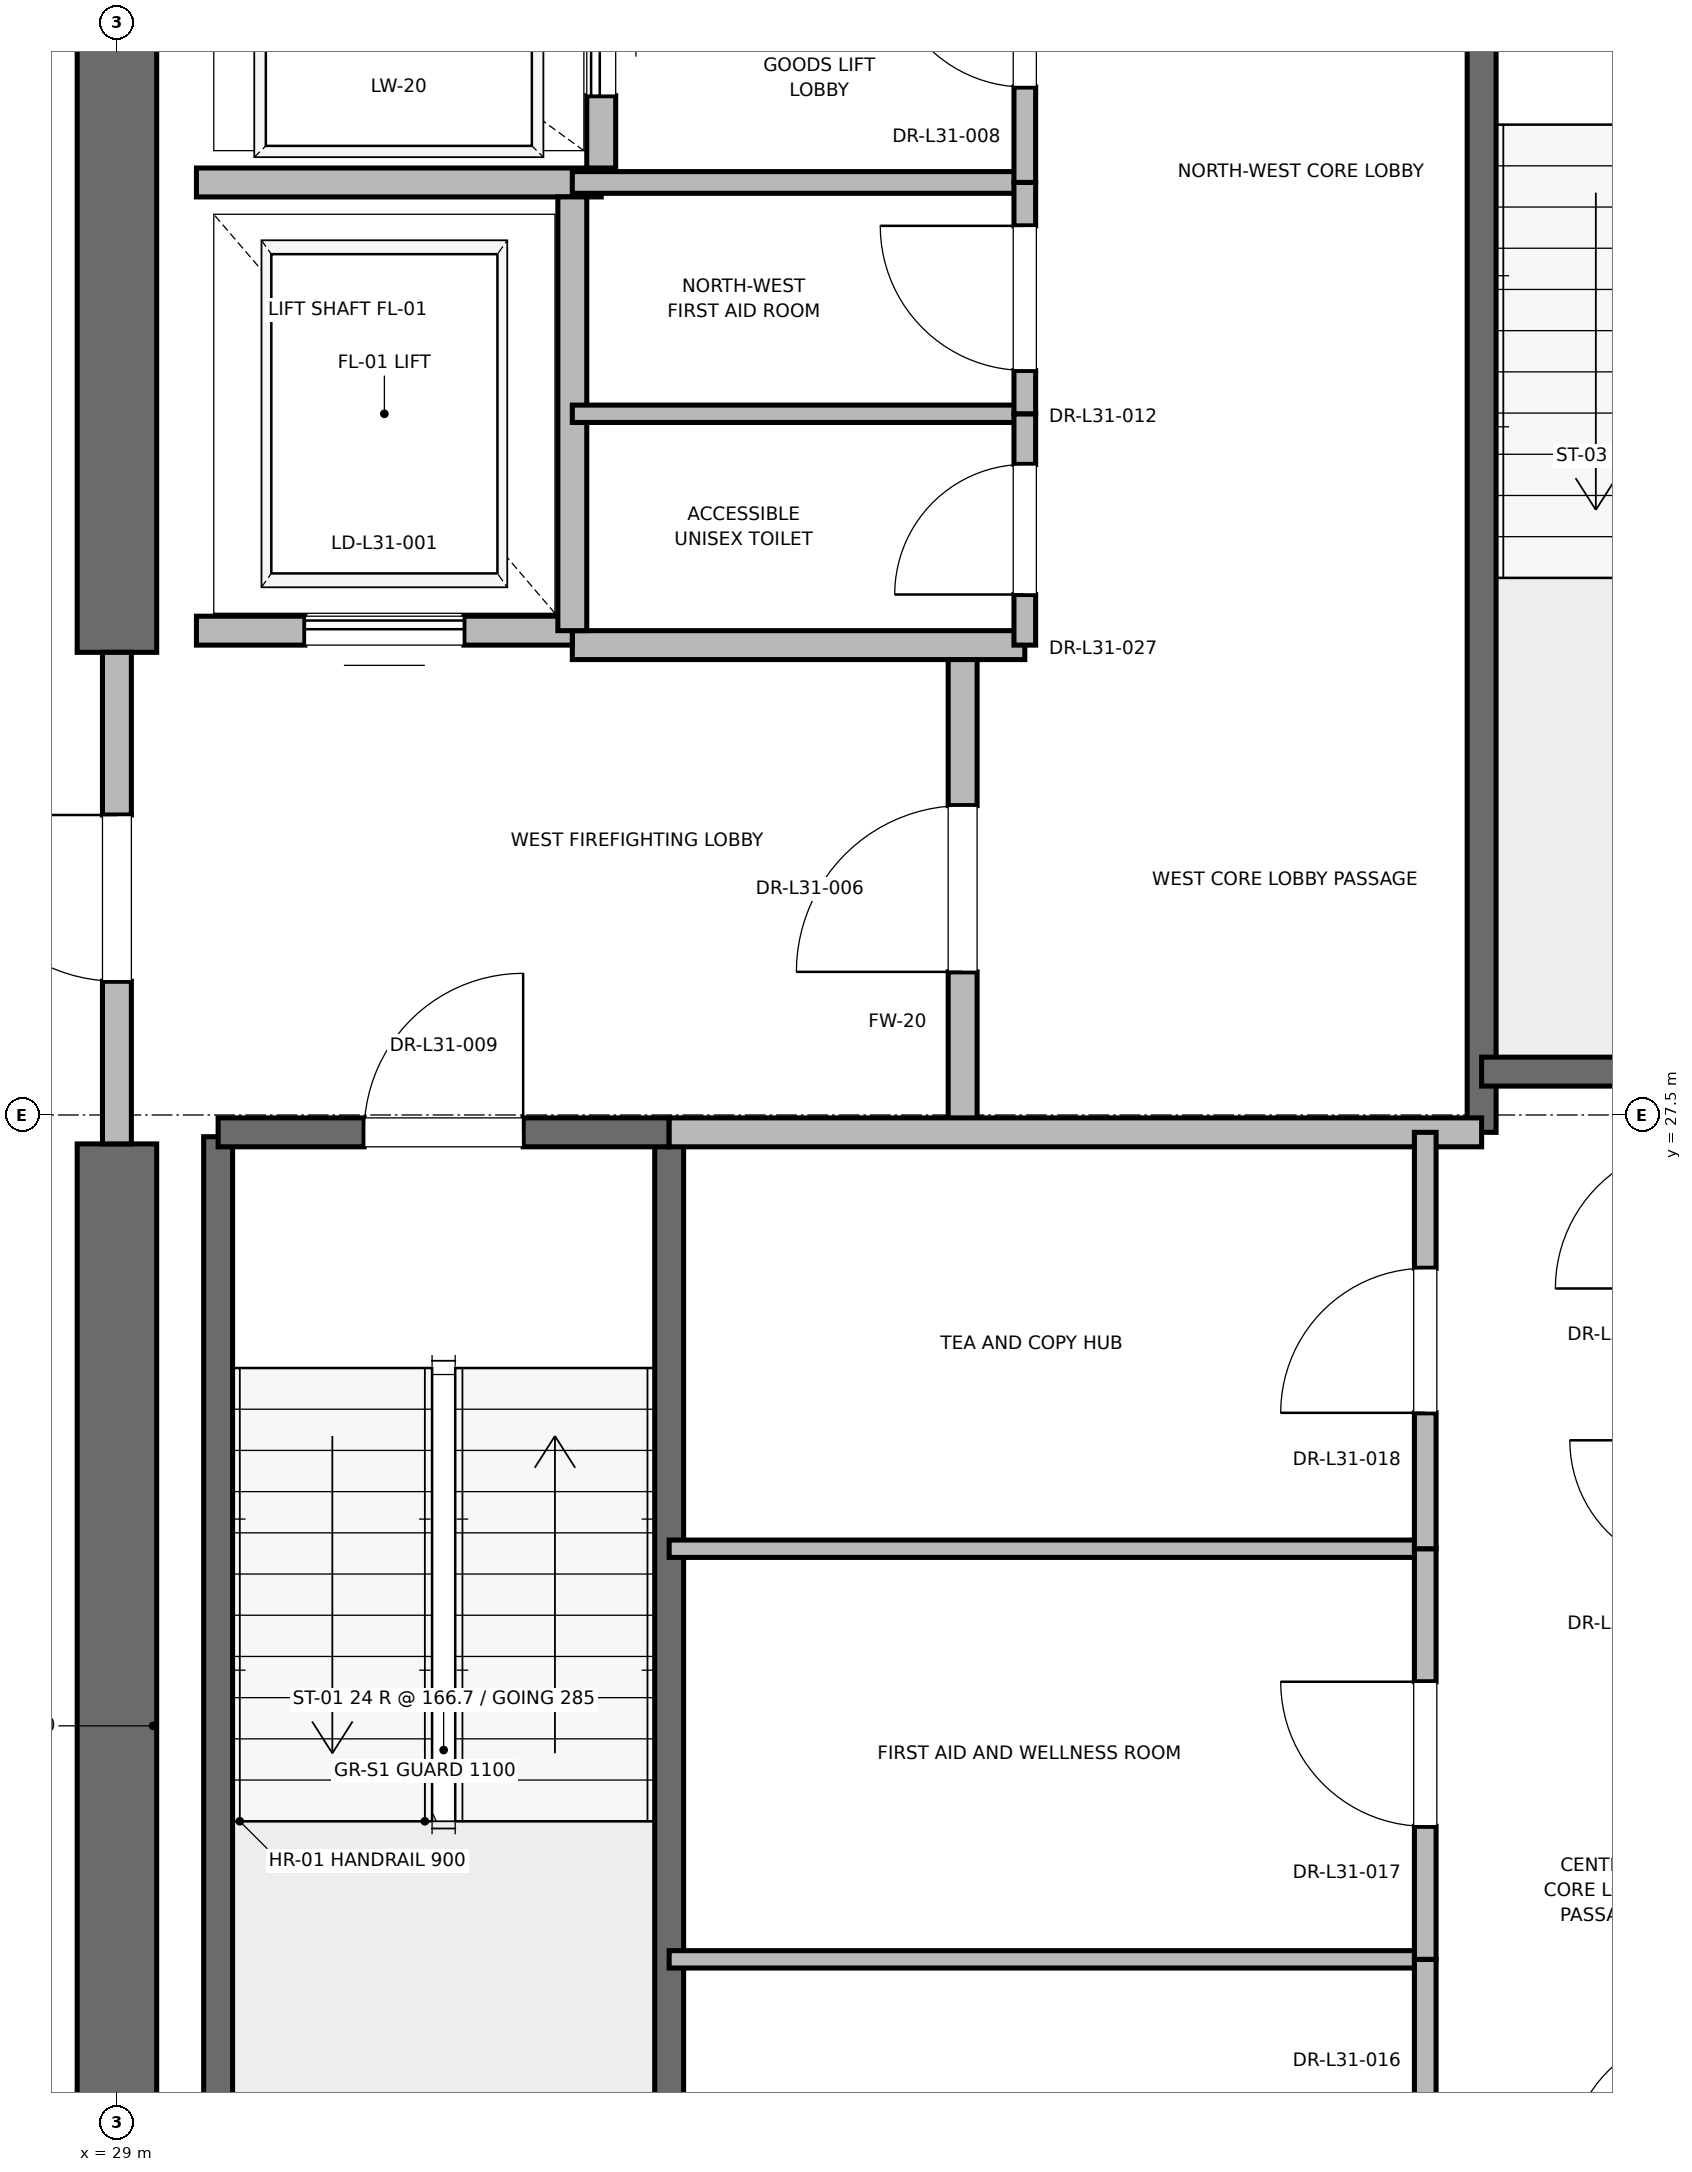
"""IFC4 building model, lengths in metres.
Left out: names, types, materials, properties, quantities, classifications, styles, units other than length and angle.
Written with IfcOpenShell. Run it as: python <this file> out.ifc"""

import sys

from ifc_helpers import new_model, si_unit, direction, frame, frame_2d, origin, place, context, subcontext, project, spatial, rectangle, extrude, element, fill, save


model = new_model("IFC4")
c1 = context("Model", 3, precision=1e-05, world=origin(), true_north=direction((0.0, 1.0)))
c2 = subcontext(c1, "Body", "Model", "MODEL_VIEW")
j1 = project(units=[si_unit("LENGTHUNIT", "METRE"), si_unit("PLANEANGLEUNIT", "RADIAN")], contexts=[c1])
p1 = place(None, origin())
s1 = spatial("IfcSite", under=j1, at=p1, CompositionType="ELEMENT")
p2 = place(p1, origin())
s2 = spatial("IfcBuilding", under=s1, at=p2, CompositionType="ELEMENT")
p3 = place(p2, frame((0.0, 0.0, 136.4)))
s3 = spatial("IfcBuildingStorey", under=s2, at=p3, CompositionType="ELEMENT", Elevation=136.4)
p4 = place(p3, frame((29.0, 18.5, 0.0), z_axis=(0.0, 0.0, 1.0), x_axis=(0.0, 1.0, 0.0)))
e1 = element("IfcWall", 1, at=p4, inside=s3, PredefinedType="SHEAR", context=c2, shape_type="SweptSolid", body=[
    extrude(rectangle(XDim=8.8, YDim=0.55, at=frame_2d((4.4, 0.0))), origin(), (0.0, 0.0, 1.0), 3.775),
])
p5 = place(p3, frame((29.0, 30.7, 0.0), z_axis=(0.0, 0.0, 1.0), x_axis=(0.0, 1.0, 0.0)))
e2 = element("IfcWall", 2, at=p5, inside=s3, PredefinedType="SHEAR", context=c2, shape_type="SweptSolid", body=[
    extrude(rectangle(XDim=5.8, YDim=0.55, at=frame_2d((2.9, 0.0))), origin(), (0.0, 0.0, 1.0), 3.775),
])
p6 = place(p3, frame((29.7, 19.2, 0.0), z_axis=(0.0, 0.0, 1.0), x_axis=(0.0, 1.0, 0.0)))
e3 = element("IfcWall", 3, at=p6, inside=s3, PredefinedType="SOLIDWALL", context=c2, shape_type="SweptSolid", body=[
    extrude(rectangle(XDim=8.15, YDim=0.2, at=frame_2d((4.075, 0.0))), origin(), (0.0, 0.0, 1.0), 3.775),
])
p7 = place(p3, frame((32.82, 18.6, 0.0), z_axis=(0.0, 0.0, 1.0), x_axis=(0.0, 1.0, 0.0)))
e4 = element("IfcWall", 4, at=p7, inside=s3, PredefinedType="SOLIDWALL", context=c2, shape_type="SweptSolid", body=[
    extrude(rectangle(XDim=8.78, YDim=0.2, at=frame_2d((4.39, 0.0))), origin(), (0.0, 0.0, 1.0), 3.775),
])
p8 = place(p3, frame((29.7, 27.38, 0.0), z_axis=(0.0, 0.0, 1.0), x_axis=(1.0, 0.0, 0.0)))
e5 = element("IfcWall", 5, at=p8, inside=s3, PredefinedType="SOLIDWALL", context=c2, shape_type="SweptSolid", body=[
    extrude(rectangle(XDim=3.12, YDim=0.2, at=frame_2d((1.56, 0.0))), origin(), (0.0, 0.0, 1.0), 3.775),
])
p9 = place(p8, frame((1.01, 0.0, 0.0)))
e6 = element("IfcOpeningElement", 6, at=p9, cuts=e5, PredefinedType="OPENING", context=c2, shape_type="SweptSolid", body=[
    extrude(rectangle(XDim=1.1, YDim=2.15, at=frame_2d((0.55, 1.075))), frame((0.0, 0.1, 0.0), z_axis=(0.0, -1.0, 0.0), x_axis=(1.0, 0.0, 0.0)), (0.0, 0.0, 1.0), 0.2),
])
p10 = place(p3, frame((38.44, 27.38, 0.0), z_axis=(0.0, 0.0, 1.0), x_axis=(0.0, 1.0, 0.0)))
e7 = element("IfcWall", 7, at=p10, inside=s3, PredefinedType="SOLIDWALL", context=c2, shape_type="SweptSolid", body=[
    extrude(rectangle(XDim=8.87, YDim=0.2, at=frame_2d((4.435, 0.0))), origin(), (0.0, 0.0, 1.0), 3.775),
])
p11 = place(p3, frame((38.44, 27.8, 0.0), z_axis=(0.0, 0.0, 1.0), x_axis=(1.0, 0.0, 0.0)))
e8 = element("IfcWall", 8, at=p11, inside=s3, PredefinedType="SOLIDWALL", context=c2, shape_type="SweptSolid", body=[
    extrude(rectangle(XDim=3.32, YDim=0.2, at=frame_2d((1.66, 0.0))), origin(), (0.0, 0.0, 1.0), 3.775),
])
p12 = place(p3, frame((34.85, 27.38, 0.0), z_axis=(0.0, 0.0, 1.0), x_axis=(0.0, 1.0, 0.0)))
e9 = element("IfcWall", 9, at=p12, inside=s3, PredefinedType="PARTITIONING", context=c2, shape_type="SweptSolid", body=[
    extrude(rectangle(XDim=3.37, YDim=0.2, at=frame_2d((1.685, 0.0))), origin(), (0.0, 0.0, 1.0), 3.775),
])
p13 = place(p12, frame((1.11, 0.0, 0.0)))
e10 = element("IfcOpeningElement", 10, at=p13, cuts=e9, PredefinedType="OPENING", context=c2, shape_type="SweptSolid", body=[
    extrude(rectangle(XDim=1.15, YDim=2.2, at=frame_2d((0.575, 1.1))), frame((0.0, 0.1, 0.0), z_axis=(0.0, -1.0, 0.0), x_axis=(1.0, 0.0, 0.0)), (0.0, 0.0, 1.0), 0.2),
])
p14 = place(p3, frame((29.0, 27.3, 0.0), z_axis=(0.0, 0.0, 1.0), x_axis=(0.0, 1.0, 0.0)))
e11 = element("IfcWall", 11, at=p14, inside=s3, PredefinedType="PARTITIONING", context=c2, shape_type="SweptSolid", body=[
    extrude(rectangle(XDim=3.4, YDim=0.2, at=frame_2d((1.7, 0.0))), origin(), (0.0, 0.0, 1.0), 2.755),
])
p15 = place(p14, frame((1.125, 0.0, 0.0)))
e12 = element("IfcOpeningElement", 12, at=p15, cuts=e11, PredefinedType="OPENING", context=c2, shape_type="SweptSolid", body=[
    extrude(rectangle(XDim=1.15, YDim=2.2, at=frame_2d((0.575, 1.1))), frame((0.0, 0.1, 0.0), z_axis=(0.0, -1.0, 0.0), x_axis=(1.0, 0.0, 0.0)), (0.0, 0.0, 1.0), 0.2),
])
p16 = place(p3, frame((32.82, 27.38, 0.0), z_axis=(0.0, 0.0, 1.0), x_axis=(1.0, 0.0, 0.0)))
e13 = element("IfcWall", 13, at=p16, inside=s3, PredefinedType="PARTITIONING", context=c2, shape_type="SweptSolid", body=[
    extrude(rectangle(XDim=5.62, YDim=0.2, at=frame_2d((2.81, 0.0))), origin(), (0.0, 0.0, 1.0), 3.775),
])
p17 = place(p3, frame((32.15, 30.75, 0.0), z_axis=(0.0, 0.0, 1.0), x_axis=(1.0, 0.0, 0.0)))
e14 = element("IfcWall", 14, at=p17, inside=s3, PredefinedType="PARTITIONING", context=c2, shape_type="SweptSolid", body=[
    extrude(rectangle(XDim=3.13, YDim=0.2, at=frame_2d((1.565, 0.0))), origin(), (0.0, 0.0, 1.0), 3.775),
])
p18 = place(p3, frame((29.55, 30.85, 0.0), z_axis=(0.0, 0.0, 1.0), x_axis=(1.0, 0.0, 0.0)))
e15 = element("IfcWall", 15, at=p18, inside=s3, PredefinedType="SOLIDWALL", context=c2, shape_type="SweptSolid", body=[
    extrude(rectangle(XDim=2.6, YDim=0.2, at=frame_2d((1.3, 0.0))), origin(), (0.0, 0.0, 1.0), 2.755),
])
p19 = place(p18, frame((0.75, 0.0, 0.0)))
e16 = element("IfcOpeningElement", 16, at=p19, cuts=e15, PredefinedType="OPENING", context=c2, shape_type="SweptSolid", body=[
    extrude(rectangle(XDim=1.1, YDim=2.2, at=frame_2d((0.55, 1.1))), frame((0.0, 0.1, 0.0), z_axis=(0.0, -1.0, 0.0), x_axis=(1.0, 0.0, 0.0)), (0.0, 0.0, 1.0), 0.2),
])
p20 = place(p3, frame((29.55, 33.95, 0.0), z_axis=(0.0, 0.0, 1.0), x_axis=(1.0, 0.0, 0.0)))
e17 = element("IfcWall", 17, at=p20, inside=s3, PredefinedType="SOLIDWALL", context=c2, shape_type="SweptSolid", body=[
    extrude(rectangle(XDim=2.8, YDim=0.2, at=frame_2d((1.4, 0.0))), origin(), (0.0, 0.0, 1.0), 3.775),
])
p21 = place(p3, frame((32.15, 30.85, 0.0), z_axis=(0.0, 0.0, 1.0), x_axis=(0.0, 1.0, 0.0)))
e18 = element("IfcWall", 18, at=p21, inside=s3, PredefinedType="SOLIDWALL", context=c2, shape_type="SweptSolid", body=[
    extrude(rectangle(XDim=3.0, YDim=0.2, at=frame_2d((1.5, 0.0))), origin(), (0.0, 0.0, 1.0), 3.775),
])
p22 = place(p3, frame((32.35, 34.05, 0.0), z_axis=(0.0, 0.0, 1.0), x_axis=(0.0, 1.0, 0.0)))
e19 = element("IfcWall", 19, at=p22, inside=s3, PredefinedType="SOLIDWALL", context=c2, shape_type="SweptSolid", body=[
    extrude(rectangle(XDim=2.1, YDim=0.2, at=frame_2d((1.05, 0.0))), origin(), (0.0, 0.0, 1.0), 3.775),
])
p23 = place(p22, frame((0.5, 0.0, 0.0)))
e20 = element("IfcOpeningElement", 20, at=p23, cuts=e19, PredefinedType="OPENING", context=c2, shape_type="SweptSolid", body=[
    extrude(rectangle(XDim=1.1, YDim=2.2, at=frame_2d((0.55, 1.1))), frame((0.0, 0.1, 0.0), z_axis=(0.0, -1.0, 0.0), x_axis=(1.0, 0.0, 0.0)), (0.0, 0.0, 1.0), 0.2),
])
p24 = place(p3, frame((32.15, 33.95, 0.0), z_axis=(0.0, 0.0, 1.0), x_axis=(1.0, 0.0, 0.0)))
e21 = element("IfcWall", 21, at=p24, inside=s3, PredefinedType="PARTITIONING", context=c2, shape_type="SweptSolid", body=[
    extrude(rectangle(XDim=3.13, YDim=0.15, at=frame_2d((1.565, 0.0))), origin(), (0.0, 0.0, 1.0), 2.85),
])
p25 = place(p3, frame((35.28, 33.95, 0.0), z_axis=(0.0, 0.0, 1.0), x_axis=(0.0, 1.0, 0.0)))
e22 = element("IfcWall", 22, at=p25, inside=s3, PredefinedType="PARTITIONING", context=c2, shape_type="SweptSolid", body=[
    extrude(rectangle(XDim=2.27, YDim=0.15, at=frame_2d((1.135, 0.0))), origin(), (0.0, 0.0, 1.0), 2.755),
])
p26 = place(p25, frame((0.66, 0.0, 0.0)))
e23 = element("IfcOpeningElement", 23, at=p26, cuts=e22, PredefinedType="OPENING", context=c2, shape_type="SweptSolid", body=[
    extrude(rectangle(XDim=0.95, YDim=2.15, at=frame_2d((0.475, 1.075))), frame((0.0, 0.075, 0.0), z_axis=(0.0, -1.0, 0.0), x_axis=(1.0, 0.0, 0.0)), (0.0, 0.0, 1.0), 0.15),
])
p27 = place(p3, frame((32.15, 32.35, 0.0), z_axis=(0.0, 0.0, 1.0), x_axis=(1.0, 0.0, 0.0)))
e24 = element("IfcWall", 24, at=p27, inside=s3, PredefinedType="PARTITIONING", context=c2, shape_type="SweptSolid", body=[
    extrude(rectangle(XDim=3.13, YDim=0.12, at=frame_2d((1.565, 0.0))), origin(), (0.0, 0.0, 1.0), 2.85),
])
p28 = place(p3, frame((35.28, 30.75, 0.0), z_axis=(0.0, 0.0, 1.0), x_axis=(0.0, 1.0, 0.0)))
e25 = element("IfcWall", 25, at=p28, inside=s3, PredefinedType="PARTITIONING", context=c2, shape_type="SweptSolid", body=[
    extrude(rectangle(XDim=1.6, YDim=0.15, at=frame_2d((0.8, 0.0))), origin(), (0.0, 0.0, 1.0), 2.85),
])
p29 = place(p28, frame((0.35, 0.0, 0.0)))
e26 = element("IfcOpeningElement", 26, at=p29, cuts=e25, PredefinedType="OPENING", context=c2, shape_type="SweptSolid", body=[
    extrude(rectangle(XDim=0.9, YDim=2.1, at=frame_2d((0.45, 1.05))), frame((0.0, 0.075, 0.0), z_axis=(0.0, -1.0, 0.0), x_axis=(1.0, 0.0, 0.0)), (0.0, 0.0, 1.0), 0.15),
])
p30 = place(p3, frame((35.28, 32.35, 0.0), z_axis=(0.0, 0.0, 1.0), x_axis=(0.0, 1.0, 0.0)))
e27 = element("IfcWall", 27, at=p30, inside=s3, PredefinedType="PARTITIONING", context=c2, shape_type="SweptSolid", body=[
    extrude(rectangle(XDim=1.6, YDim=0.15, at=frame_2d((0.8, 0.0))), origin(), (0.0, 0.0, 1.0), 2.85),
])
p31 = place(p30, frame((0.3, 0.0, 0.0)))
e28 = element("IfcOpeningElement", 28, at=p31, cuts=e27, PredefinedType="OPENING", context=c2, shape_type="SweptSolid", body=[
    extrude(rectangle(XDim=1.0, YDim=2.15, at=frame_2d((0.5, 1.075))), frame((0.0, 0.075, 0.0), z_axis=(0.0, -1.0, 0.0), x_axis=(1.0, 0.0, 0.0)), (0.0, 0.0, 1.0), 0.15),
])
for number, where, z_axis, x_axis in (
    (29, (32.82, 21.66, 0.0), (0.0, 0.0, 1.0), (1.0, 0.0, 0.0)),
    (30, (32.82, 24.5, 0.0), (0.0, 0.0, 1.0), (1.0, 0.0, 0.0)),
):
    element("IfcWall", number, at=place(p3, frame(where, z_axis=z_axis, x_axis=x_axis)), inside=s3, PredefinedType="PARTITIONING", context=c2, shape_type="SweptSolid", body=[
        extrude(rectangle(XDim=5.23, YDim=0.12, at=frame_2d((2.615, 0.0))), origin(), (0.0, 0.0, 1.0), 2.85),
    ])
p32 = place(p3, frame((38.05, 18.6, 0.0), z_axis=(0.0, 0.0, 1.0), x_axis=(0.0, 1.0, 0.0)))
e31 = element("IfcWall", 31, at=p32, inside=s3, PredefinedType="PARTITIONING", context=c2, shape_type="SweptSolid", body=[
    extrude(rectangle(XDim=3.06, YDim=0.15, at=frame_2d((1.53, 0.0))), origin(), (0.0, 0.0, 1.0), 2.755),
])
p33 = place(p32, frame((1.03, 0.0, 0.0)))
e32 = element("IfcOpeningElement", 32, at=p33, cuts=e31, PredefinedType="OPENING", context=c2, shape_type="SweptSolid", body=[
    extrude(rectangle(XDim=1.0, YDim=2.15, at=frame_2d((0.5, 1.075))), frame((0.0, 0.075, 0.0), z_axis=(0.0, -1.0, 0.0), x_axis=(1.0, 0.0, 0.0)), (0.0, 0.0, 1.0), 0.15),
])
p34 = place(p3, frame((38.05, 21.66, 0.0), z_axis=(0.0, 0.0, 1.0), x_axis=(0.0, 1.0, 0.0)))
e33 = element("IfcWall", 33, at=p34, inside=s3, PredefinedType="PARTITIONING", context=c2, shape_type="SweptSolid", body=[
    extrude(rectangle(XDim=2.84, YDim=0.15, at=frame_2d((1.42, 0.0))), origin(), (0.0, 0.0, 1.0), 2.85),
])
p35 = place(p34, frame((0.92, 0.0, 0.0)))
e34 = element("IfcOpeningElement", 34, at=p35, cuts=e33, PredefinedType="OPENING", context=c2, shape_type="SweptSolid", body=[
    extrude(rectangle(XDim=1.0, YDim=2.15, at=frame_2d((0.5, 1.075))), frame((0.0, 0.075, 0.0), z_axis=(0.0, -1.0, 0.0), x_axis=(1.0, 0.0, 0.0)), (0.0, 0.0, 1.0), 0.15),
])
p36 = place(p3, frame((38.05, 24.5, 0.0), z_axis=(0.0, 0.0, 1.0), x_axis=(0.0, 1.0, 0.0)))
e35 = element("IfcWall", 35, at=p36, inside=s3, PredefinedType="PARTITIONING", context=c2, shape_type="SweptSolid", body=[
    extrude(rectangle(XDim=2.88, YDim=0.15, at=frame_2d((1.44, 0.0))), origin(), (0.0, 0.0, 1.0), 2.85),
])
p37 = place(p36, frame((0.94, 0.0, 0.0)))
e36 = element("IfcOpeningElement", 36, at=p37, cuts=e35, PredefinedType="OPENING", context=c2, shape_type="SweptSolid", body=[
    extrude(rectangle(XDim=1.0, YDim=2.15, at=frame_2d((0.5, 1.075))), frame((0.0, 0.075, 0.0), z_axis=(0.0, -1.0, 0.0), x_axis=(1.0, 0.0, 0.0)), (0.0, 0.0, 1.0), 0.15),
])
p38 = place(p9, origin())
e37 = element("IfcDoor", 37, at=p38, inside=s3, OperationType="SINGLE_SWING_RIGHT", PredefinedType="DOOR", context=c2, shape_type="SweptSolid", body=[
    extrude(rectangle(XDim=1.1, YDim=2.15, at=frame_2d((0.55, 1.075))), frame((0.0, 0.025, 0.0), z_axis=(0.0, -1.0, 0.0), x_axis=(1.0, 0.0, 0.0)), (0.0, 0.0, 1.0), 0.05),
])
fill(e6, e37)
p39 = place(p13, origin())
e38 = element("IfcDoor", 38, at=p39, inside=s3, OperationType="SINGLE_SWING_LEFT", PredefinedType="DOOR", context=c2, shape_type="SweptSolid", body=[
    extrude(rectangle(XDim=1.15, YDim=2.2, at=frame_2d((0.575, 1.1))), frame((0.0, 0.025, 0.0), z_axis=(0.0, -1.0, 0.0), x_axis=(1.0, 0.0, 0.0)), (0.0, 0.0, 1.0), 0.05),
])
fill(e10, e38)
p40 = place(p15, origin())
e39 = element("IfcDoor", 39, at=p40, inside=s3, OperationType="SINGLE_SWING_RIGHT", PredefinedType="DOOR", context=c2, shape_type="SweptSolid", body=[
    extrude(rectangle(XDim=1.15, YDim=2.2, at=frame_2d((0.575, 1.1))), frame((0.0, 0.025, 0.0), z_axis=(0.0, -1.0, 0.0), x_axis=(1.0, 0.0, 0.0)), (0.0, 0.0, 1.0), 0.05),
])
fill(e12, e39)
p41 = place(p19, origin())
e40 = element("IfcDoor", 40, at=p41, inside=s3, OperationType="SLIDING_TO_RIGHT", PredefinedType="DOOR", context=c2, shape_type="SweptSolid", body=[
    extrude(rectangle(XDim=1.1, YDim=2.2, at=frame_2d((0.55, 1.1))), frame((0.0, 0.025, 0.0), z_axis=(0.0, -1.0, 0.0), x_axis=(1.0, 0.0, 0.0)), (0.0, 0.0, 1.0), 0.05),
])
fill(e16, e40)
p42 = place(p23, origin())
e41 = element("IfcDoor", 41, at=p42, inside=s3, OperationType="SLIDING_TO_RIGHT", PredefinedType="DOOR", context=c2, shape_type="SweptSolid", body=[
    extrude(rectangle(XDim=1.1, YDim=2.2, at=frame_2d((0.55, 1.1))), frame((0.0, 0.025, 0.0), z_axis=(0.0, -1.0, 0.0), x_axis=(1.0, 0.0, 0.0)), (0.0, 0.0, 1.0), 0.05),
])
fill(e20, e41)
p43 = place(p26, origin())
e42 = element("IfcDoor", 42, at=p43, inside=s3, OperationType="SINGLE_SWING_RIGHT", PredefinedType="DOOR", context=c2, shape_type="SweptSolid", body=[
    extrude(rectangle(XDim=0.95, YDim=2.15, at=frame_2d((0.475, 1.075))), frame((0.0, 0.025, 0.0), z_axis=(0.0, -1.0, 0.0), x_axis=(1.0, 0.0, 0.0)), (0.0, 0.0, 1.0), 0.05),
])
fill(e23, e42)
p44 = place(p29, origin())
e43 = element("IfcDoor", 43, at=p44, inside=s3, OperationType="SINGLE_SWING_LEFT", PredefinedType="DOOR", context=c2, shape_type="SweptSolid", body=[
    extrude(rectangle(XDim=0.9, YDim=2.1, at=frame_2d((0.45, 1.05))), frame((0.0, 0.025, 0.0), z_axis=(0.0, -1.0, 0.0), x_axis=(1.0, 0.0, 0.0)), (0.0, 0.0, 1.0), 0.05),
])
fill(e26, e43)
p45 = place(p31, origin())
e44 = element("IfcDoor", 44, at=p45, inside=s3, OperationType="SINGLE_SWING_RIGHT", PredefinedType="DOOR", context=c2, shape_type="SweptSolid", body=[
    extrude(rectangle(XDim=1.0, YDim=2.15, at=frame_2d((0.5, 1.075))), frame((0.0, 0.025, 0.0), z_axis=(0.0, -1.0, 0.0), x_axis=(1.0, 0.0, 0.0)), (0.0, 0.0, 1.0), 0.05),
])
fill(e28, e44)
p46 = place(p35, origin())
e45 = element("IfcDoor", 45, at=p46, inside=s3, OperationType="SINGLE_SWING_RIGHT", PredefinedType="DOOR", context=c2, shape_type="SweptSolid", body=[
    extrude(rectangle(XDim=1.0, YDim=2.15, at=frame_2d((0.5, 1.075))), frame((0.0, 0.025, 0.0), z_axis=(0.0, -1.0, 0.0), x_axis=(1.0, 0.0, 0.0)), (0.0, 0.0, 1.0), 0.05),
])
fill(e34, e45)
p47 = place(p37, origin())
e46 = element("IfcDoor", 46, at=p47, inside=s3, OperationType="SINGLE_SWING_LEFT", PredefinedType="DOOR", context=c2, shape_type="SweptSolid", body=[
    extrude(rectangle(XDim=1.0, YDim=2.15, at=frame_2d((0.5, 1.075))), frame((0.0, 0.025, 0.0), z_axis=(0.0, -1.0, 0.0), x_axis=(1.0, 0.0, 0.0)), (0.0, 0.0, 1.0), 0.05),
])
fill(e36, e46)
save(model, sys.argv[1])
